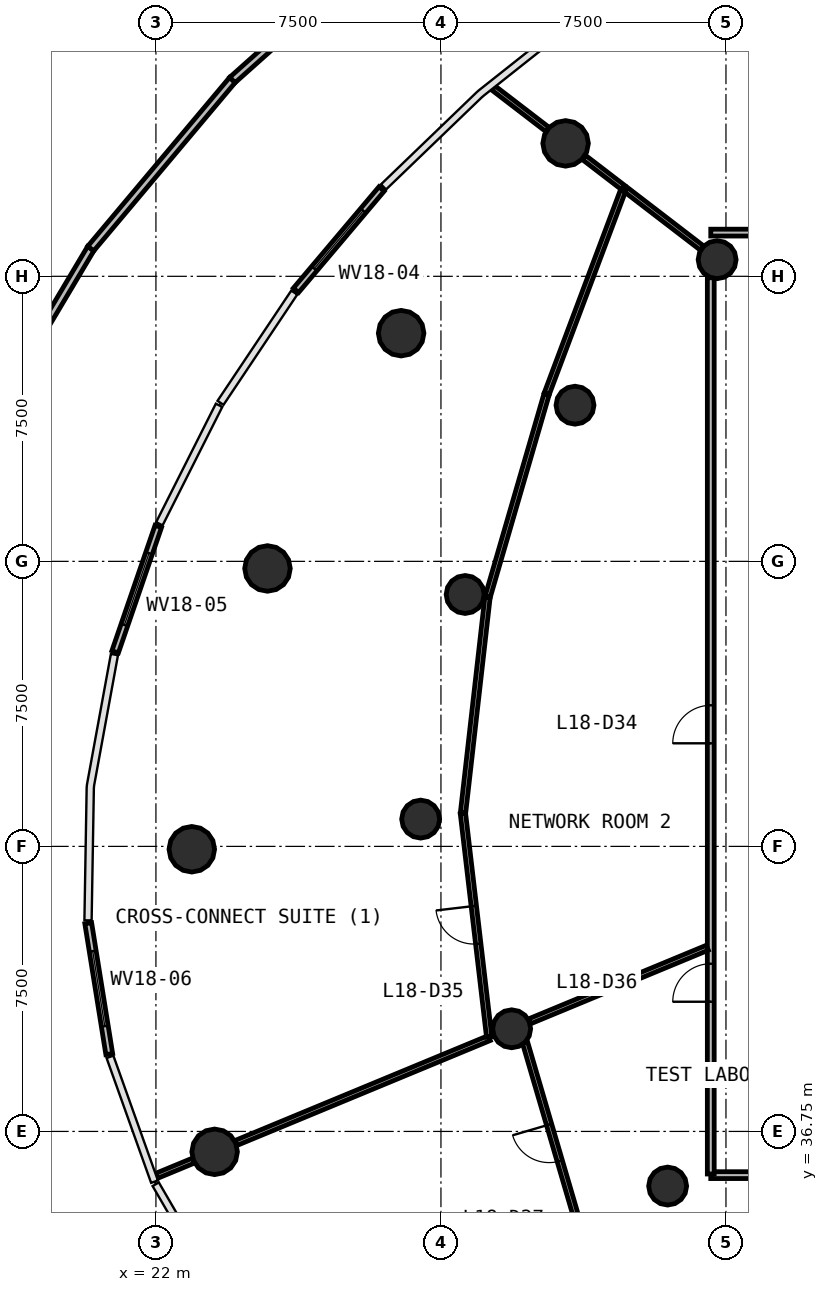
"""IFC4 building model, lengths in metres.
Left out: names, types, materials, properties, quantities, classifications, styles, units other than length and angle.
Written with IfcOpenShell. Run it as: python <this file> out.ifc"""

import sys

from ifc_helpers import new_model, si_unit, direction, frame, frame_2d, origin, origin_2d, place, context, subcontext, project, spatial, rectangle, circle, extrude, source, transform, mapped, element, fill, save


model = new_model("IFC4")
c1 = context("Model", 3, precision=1e-05, world=origin(), true_north=direction((0.0, 1.0)))
c2 = subcontext(c1, "Body", "Model", "MODEL_VIEW")
j1 = project(units=[si_unit("LENGTHUNIT", "METRE"), si_unit("PLANEANGLEUNIT", "RADIAN")], contexts=[c1])
p1 = place(None, origin())
s1 = spatial("IfcSite", under=j1, at=p1, CompositionType="ELEMENT")
p2 = place(p1, origin())
s2 = spatial("IfcBuilding", under=s1, at=p2, CompositionType="ELEMENT")
p3 = place(p2, frame((0.0, 0.0, 79.8)))
s3 = spatial("IfcBuildingStorey", under=s2, at=p3, CompositionType="ELEMENT", Elevation=79.8)
m1 = source(origin(), c2, "Body", "SweptSolid", [
    extrude(circle(Radius=0.6, at=origin_2d()), origin(), (0.0, 0.0, 1.0), 4.5),
])
for number, where, z_axis, x_axis in (
    (1, (32.78, 62.748, -0.4), (0.0, 0.0, 1.0), (1.0, 0.0, 0.0)),
    (2, (28.452, 57.754, -0.4), (0.0, 0.0, 1.0), (1.0, 0.0, 0.0)),
    (3, (24.936, 51.563, -0.4), (0.0, 0.0, 1.0), (1.0, 0.0, 0.0)),
    (4, (22.944, 44.175, -0.4), (0.0, 0.0, 1.0), (1.0, 0.0, 0.0)),
    (5, (23.544, 36.213, -0.4), (0.0, 0.0, 1.0), (1.0, 0.0, 0.0)),
):
    element("IfcColumn", number, at=place(p3, frame(where, z_axis=z_axis, x_axis=x_axis)), inside=s3, PredefinedType="COLUMN", context=c2, shape_type="MappedRepresentation", body=[
        mapped(m1, transform((0.0, 0.0, 0.0), scale=1.0)),
    ])
m2 = source(origin(), c2, "Body", "SweptSolid", [
    extrude(circle(Radius=0.5, at=origin_2d()), origin(), (0.0, 0.0, 1.0), 4.1),
])
for number, where, z_axis, x_axis in (
    (6, (36.768, 59.688, 0.0), (0.0, 0.0, 1.0), (1.0, 0.0, 0.0)),
    (7, (33.028, 55.859, 0.0), (0.0, 0.0, 1.0), (1.0, 0.0, 0.0)),
    (8, (30.137, 50.878, 0.0), (0.0, 0.0, 1.0), (1.0, 0.0, 0.0)),
    (9, (28.966, 44.968, 0.0), (0.0, 0.0, 1.0), (1.0, 0.0, 0.0)),
    (10, (31.361, 39.451, 0.0), (0.0, 0.0, 1.0), (1.0, 0.0, 0.0)),
    (11, (35.465, 35.312, 0.0), (0.0, 0.0, 1.0), (1.0, 0.0, 0.0)),
):
    element("IfcColumn", number, at=place(p3, frame(where, z_axis=z_axis, x_axis=x_axis)), inside=s3, PredefinedType="COLUMN", context=c2, shape_type="MappedRepresentation", body=[
        mapped(m2, transform((0.0, 0.0, 0.0), scale=1.0)),
    ])
p4 = place(p3, frame((27.938, 61.549, 0.0), z_axis=(0.0, 0.0, 1.0), x_axis=(-0.645349538413, -0.763887408765, 0.0)))
e12 = element("IfcWall", 12, at=p4, inside=s3, PredefinedType="STANDARD", context=c2, shape_type="SweptSolid", body=[
    extrude(rectangle(XDim=3.491, YDim=0.18, at=frame_2d((1.746, 0.0))), origin(), (0.0, 0.0, 1.0), 3.7),
])
p5 = place(p4, frame((0.746, 0.0, 0.9)))
e13 = element("IfcOpeningElement", 13, at=p5, cuts=e12, PredefinedType="OPENING", context=c2, shape_type="SweptSolid", body=[
    extrude(rectangle(XDim=2.0, YDim=2.2, at=frame_2d((1.0, 1.1))), frame((0.0, 0.1, 0.0), z_axis=(0.0, -1.0, 0.0), x_axis=(1.0, 0.0, 0.0)), (0.0, 0.0, 1.0), 0.2),
])
p6 = place(p3, frame((22.062, 52.67, 0.0), z_axis=(0.0, 0.0, 1.0), x_axis=(-0.325113007856, -0.945675172627, 0.0)))
e14 = element("IfcWall", 14, at=p6, inside=s3, PredefinedType="STANDARD", context=c2, shape_type="SweptSolid", body=[
    extrude(rectangle(XDim=3.49, YDim=0.18, at=frame_2d((1.745, 0.0))), origin(), (0.0, 0.0, 1.0), 3.7),
])
p7 = place(p6, frame((0.745, 0.0, 0.9)))
e15 = element("IfcOpeningElement", 15, at=p7, cuts=e14, PredefinedType="OPENING", context=c2, shape_type="SweptSolid", body=[
    extrude(rectangle(XDim=2.0, YDim=2.2, at=frame_2d((1.0, 1.1))), frame((0.0, 0.1, 0.0), z_axis=(0.0, -1.0, 0.0), x_axis=(1.0, 0.0, 0.0)), (0.0, 0.0, 1.0), 0.2),
])
p8 = place(p3, frame((20.219, 42.229, 0.0), z_axis=(0.0, 0.0, 1.0), x_axis=(0.15867565855, -0.987330762908, 0.0)))
e16 = element("IfcWall", 16, at=p8, inside=s3, PredefinedType="STANDARD", context=c2, shape_type="SweptSolid", body=[
    extrude(rectangle(XDim=3.488, YDim=0.18, at=frame_2d((1.744, 0.0))), origin(), (0.0, 0.0, 1.0), 3.7),
])
p9 = place(p8, frame((0.744, 0.0, 0.9)))
e17 = element("IfcOpeningElement", 17, at=p9, cuts=e16, PredefinedType="OPENING", context=c2, shape_type="SweptSolid", body=[
    extrude(rectangle(XDim=2.0, YDim=2.2, at=frame_2d((1.0, 1.1))), frame((0.0, 0.1, 0.0), z_axis=(0.0, -1.0, 0.0), x_axis=(1.0, 0.0, 0.0)), (0.0, 0.0, 1.0), 0.2),
])
p10 = place(p3, frame((17.323, 55.003, 0.0), z_axis=(0.0, 0.0, 1.0), x_axis=(0.511331211029, 0.859383728394, 0.0)))
e18 = element("IfcWall", 18, at=p10, inside=s3, PredefinedType="PARAPET", context=c2, shape_type="SweptSolid", body=[
    extrude(rectangle(XDim=5.792, YDim=0.2, at=frame_2d((2.896, 0.0))), origin(), (0.0, 0.0, 1.0), 1.1),
])
p11 = place(p3, frame((20.285, 59.981, 0.0), z_axis=(0.0, 0.0, 1.0), x_axis=(0.643341291458, 0.765579507762, 0.0)))
e19 = element("IfcWall", 19, at=p11, inside=s3, PredefinedType="PARAPET", context=c2, shape_type="SweptSolid", body=[
    extrude(rectangle(XDim=5.794, YDim=0.2, at=frame_2d((2.897, 0.0))), origin(), (0.0, 0.0, 1.0), 1.1),
])
p12 = place(p3, frame((24.013, 64.417, 0.0), z_axis=(0.0, 0.0, 1.0), x_axis=(0.746511452073, 0.665372566255, 0.0)))
e20 = element("IfcWall", 20, at=p12, inside=s3, PredefinedType="PARAPET", context=c2, shape_type="SweptSolid", body=[
    extrude(rectangle(XDim=5.795, YDim=0.2, at=frame_2d((2.897, 0.0))), origin(), (0.0, 0.0, 1.0), 1.1),
])
p13 = place(p3, frame((67.4, 35.6, 0.0), z_axis=(0.0, 0.0, 1.0), x_axis=(-1.0, 0.0, 0.0)))
e21 = element("IfcWall", 21, at=p13, inside=s3, PredefinedType="PARTITIONING", context=c2, shape_type="SweptSolid", body=[
    extrude(rectangle(XDim=30.8, YDim=0.18, at=frame_2d((15.4, 0.0))), origin(), (0.0, 0.0, 1.0), 2.9),
])
p14 = place(p13, frame((17.35, 0.0, 0.0)))
e22 = element("IfcOpeningElement", 22, at=p14, cuts=e21, PredefinedType="OPENING", context=c2, shape_type="SweptSolid", body=[
    extrude(rectangle(XDim=1.0, YDim=2.1, at=frame_2d((0.5, 1.05))), frame((0.0, 0.1, 0.0), z_axis=(0.0, -1.0, 0.0), x_axis=(1.0, 0.0, 0.0)), (0.0, 0.0, 1.0), 0.2),
])
p15 = place(p13, frame((14.95, 0.0, 0.0)))
e23 = element("IfcOpeningElement", 23, at=p15, cuts=e21, PredefinedType="OPENING", context=c2, shape_type="SweptSolid", body=[
    extrude(rectangle(XDim=1.0, YDim=2.1, at=frame_2d((0.5, 1.05))), frame((0.0, 0.1, 0.0), z_axis=(0.0, -1.0, 0.0), x_axis=(1.0, 0.0, 0.0)), (0.0, 0.0, 1.0), 0.2),
])
p16 = place(p3, frame((36.6, 60.4, 0.0), z_axis=(0.0, 0.0, 1.0), x_axis=(1.0, 0.0, 0.0)))
e24 = element("IfcWall", 24, at=p16, inside=s3, PredefinedType="PARTITIONING", context=c2, shape_type="SweptSolid", body=[
    extrude(rectangle(XDim=30.8, YDim=0.18, at=frame_2d((15.4, 0.0))), origin(), (0.0, 0.0, 1.0), 2.9),
])
p17 = place(p16, frame((25.45, 0.0, 0.0)))
e25 = element("IfcOpeningElement", 25, at=p17, cuts=e24, PredefinedType="OPENING", context=c2, shape_type="SweptSolid", body=[
    extrude(rectangle(XDim=0.9, YDim=2.1, at=frame_2d((0.45, 1.05))), frame((0.0, 0.1, 0.0), z_axis=(0.0, -1.0, 0.0), x_axis=(1.0, 0.0, 0.0)), (0.0, 0.0, 1.0), 0.2),
])
p18 = place(p16, frame((17.35, 0.0, 0.0)))
e26 = element("IfcOpeningElement", 26, at=p18, cuts=e24, PredefinedType="OPENING", context=c2, shape_type="SweptSolid", body=[
    extrude(rectangle(XDim=1.0, YDim=2.1, at=frame_2d((0.5, 1.05))), frame((0.0, 0.1, 0.0), z_axis=(0.0, -1.0, 0.0), x_axis=(1.0, 0.0, 0.0)), (0.0, 0.0, 1.0), 0.2),
])
p19 = place(p16, frame((14.95, 0.0, 0.0)))
e27 = element("IfcOpeningElement", 27, at=p19, cuts=e24, PredefinedType="OPENING", context=c2, shape_type="SweptSolid", body=[
    extrude(rectangle(XDim=1.0, YDim=2.1, at=frame_2d((0.5, 1.05))), frame((0.0, 0.1, 0.0), z_axis=(0.0, -1.0, 0.0), x_axis=(1.0, 0.0, 0.0)), (0.0, 0.0, 1.0), 0.2),
])
p20 = place(p16, frame((8.95, 0.0, 0.0)))
e28 = element("IfcOpeningElement", 28, at=p20, cuts=e24, PredefinedType="OPENING", context=c2, shape_type="SweptSolid", body=[
    extrude(rectangle(XDim=1.0, YDim=2.1, at=frame_2d((0.5, 1.05))), frame((0.0, 0.1, 0.0), z_axis=(0.0, -1.0, 0.0), x_axis=(1.0, 0.0, 0.0)), (0.0, 0.0, 1.0), 0.2),
])
p21 = place(p3, frame((36.6, 35.63, 0.0), z_axis=(0.0, 0.0, 1.0), x_axis=(0.0, 1.0, 0.0)))
e29 = element("IfcWall", 29, at=p21, inside=s3, PredefinedType="PARTITIONING", context=c2, shape_type="SweptSolid", body=[
    extrude(rectangle(XDim=23.583, YDim=0.18, at=frame_2d((11.791, 0.0))), origin(), (0.0, 0.0, 1.0), 2.9),
])
p22 = place(p21, frame((11.333, 0.0, 0.0)))
e30 = element("IfcOpeningElement", 30, at=p22, cuts=e29, PredefinedType="OPENING", context=c2, shape_type="SweptSolid", body=[
    extrude(rectangle(XDim=1.0, YDim=2.1, at=frame_2d((0.5, 1.05))), frame((0.0, 0.1, 0.0), z_axis=(0.0, -1.0, 0.0), x_axis=(1.0, 0.0, 0.0)), (0.0, 0.0, 1.0), 0.2),
])
p23 = place(p21, frame((4.532, 0.0, 0.0)))
e31 = element("IfcOpeningElement", 31, at=p23, cuts=e29, PredefinedType="OPENING", context=c2, shape_type="SweptSolid", body=[
    extrude(rectangle(XDim=1.0, YDim=2.1, at=frame_2d((0.5, 1.05))), frame((0.0, 0.1, 0.0), z_axis=(0.0, -1.0, 0.0), x_axis=(1.0, 0.0, 0.0)), (0.0, 0.0, 1.0), 0.2),
])
p24 = place(p3, frame((30.773, 39.208, 0.0), z_axis=(0.0, 0.0, 1.0), x_axis=(-0.923868434379, -0.382710224528, 0.0)))
e32 = element("IfcWall", 32, at=p24, inside=s3, PredefinedType="PARTITIONING", context=c2, shape_type="SweptSolid", body=[
    extrude(rectangle(XDim=7.219, YDim=0.14, at=frame_2d((3.609, 0.0))), origin(), (0.0, 0.0, 1.0), 2.9),
])
p25 = place(p3, frame((30.769, 39.237, 0.0), z_axis=(0.0, 0.0, 1.0), x_axis=(-0.116719162139, 0.993164959707, 0.0)))
e33 = element("IfcWall", 33, at=p25, inside=s3, PredefinedType="PARTITIONING", context=c2, shape_type="SweptSolid", body=[
    extrude(rectangle(XDim=5.917, YDim=0.14, at=frame_2d((2.959, 0.0))), origin(), (0.0, 0.0, 1.0), 2.9),
])
p26 = place(p25, frame((2.467, 0.0, 0.0)))
e34 = element("IfcOpeningElement", 34, at=p26, cuts=e33, PredefinedType="OPENING", context=c2, shape_type="SweptSolid", body=[
    extrude(rectangle(XDim=1.0, YDim=2.1, at=frame_2d((0.5, 1.05))), frame((0.0, 0.08, 0.0), z_axis=(0.0, -1.0, 0.0), x_axis=(1.0, 0.0, 0.0)), (0.0, 0.0, 1.0), 0.16),
])
p27 = place(p3, frame((34.315, 61.57, 0.0), z_axis=(0.0, 0.0, 1.0), x_axis=(-0.351670300138, -0.936123923421, 0.0)))
e35 = element("IfcWall", 35, at=p27, inside=s3, PredefinedType="PARTITIONING", context=c2, shape_type="SweptSolid", body=[
    extrude(rectangle(XDim=5.772, YDim=0.14, at=frame_2d((2.886, 0.0))), origin(), (0.0, 0.0, 1.0), 2.9),
])
p28 = place(p3, frame((30.725, 50.801, 0.0), z_axis=(0.0, 0.0, 1.0), x_axis=(-0.112859657813, -0.993610938767, 0.0)))
e36 = element("IfcWall", 36, at=p28, inside=s3, PredefinedType="PARTITIONING", context=c2, shape_type="SweptSolid", body=[
    extrude(rectangle(XDim=5.694, YDim=0.14, at=frame_2d((2.847, 0.0))), origin(), (0.0, 0.0, 1.0), 2.9),
])
p29 = place(p3, frame((33.297, 33.684, 0.0), z_axis=(0.0, 0.0, 1.0), x_axis=(-0.281401194001, 0.959590208378, 0.0)))
e37 = element("IfcWall", 37, at=p29, inside=s3, PredefinedType="PARTITIONING", context=c2, shape_type="SweptSolid", body=[
    extrude(rectangle(XDim=5.632, YDim=0.14, at=frame_2d((2.816, 0.0))), origin(), (0.0, 0.0, 1.0), 2.9),
])
p30 = place(p29, frame((2.382, 0.0, 0.0)))
e38 = element("IfcOpeningElement", 38, at=p30, cuts=e37, PredefinedType="OPENING", context=c2, shape_type="SweptSolid", body=[
    extrude(rectangle(XDim=1.0, YDim=2.1, at=frame_2d((0.5, 1.05))), frame((0.0, 0.08, 0.0), z_axis=(0.0, -1.0, 0.0), x_axis=(1.0, 0.0, 0.0)), (0.0, 0.0, 1.0), 0.16),
])
p31 = place(p3, frame((32.277, 56.137, 0.0), z_axis=(0.0, 0.0, 1.0), x_axis=(-0.279326579158, -0.960196158176, 0.0)))
e39 = element("IfcWall", 39, at=p31, inside=s3, PredefinedType="PARTITIONING", context=c2, shape_type="SweptSolid", body=[
    extrude(rectangle(XDim=5.527, YDim=0.14, at=frame_2d((2.764, 0.0))), origin(), (0.0, 0.0, 1.0), 2.9),
])
p32 = place(p3, frame((36.51, 41.584, 0.0), z_axis=(0.0, 0.0, 1.0), x_axis=(-0.923890025086, -0.382658100067, 0.0)))
e40 = element("IfcWall", 40, at=p32, inside=s3, PredefinedType="PARTITIONING", context=c2, shape_type="SweptSolid", body=[
    extrude(rectangle(XDim=5.068, YDim=0.14, at=frame_2d((2.534, 0.0))), origin(), (0.0, 0.0, 1.0), 2.9),
])
p33 = place(p3, frame((36.367, 59.995, 0.0), z_axis=(0.0, 0.0, 1.0), x_axis=(-0.793342057606, 0.608776132609, 0.0)))
e41 = element("IfcWall", 41, at=p33, inside=s3, PredefinedType="PARTITIONING", context=c2, shape_type="SweptSolid", body=[
    extrude(rectangle(XDim=2.513, YDim=0.14, at=frame_2d((1.257, 0.0))), origin(), (0.0, 0.0, 1.0), 2.9),
])
p34 = place(p3, frame((32.301, 63.116, 0.0), z_axis=(0.0, 0.0, 1.0), x_axis=(-0.793353764311, 0.608760876415, 0.0)))
e42 = element("IfcWall", 42, at=p34, inside=s3, PredefinedType="PARTITIONING", context=c2, shape_type="SweptSolid", body=[
    extrude(rectangle(XDim=1.79, YDim=0.14, at=frame_2d((0.895, 0.0))), origin(), (0.0, 0.0, 1.0), 2.9),
])
p35 = place(p3, frame((34.292, 61.588, 0.0), z_axis=(0.0, 0.0, 1.0), x_axis=(-0.793397863959, 0.608703400241, 0.0)))
e43 = element("IfcWall", 43, at=p35, inside=s3, PredefinedType="PARTITIONING", context=c2, shape_type="SweptSolid", body=[
    extrude(rectangle(XDim=1.301, YDim=0.14, at=frame_2d((0.65, 0.0))), origin(), (0.0, 0.0, 1.0), 2.9),
])
p36 = place(p3, frame((22.986, 35.982, 0.0), z_axis=(0.0, 0.0, 1.0), x_axis=(-0.923884060829, -0.382672499857, 0.0)))
e44 = element("IfcWall", 44, at=p36, inside=s3, PredefinedType="PARTITIONING", context=c2, shape_type="SweptSolid", body=[
    extrude(rectangle(XDim=1.053, YDim=0.14, at=frame_2d((0.527, 0.0))), origin(), (0.0, 0.0, 1.0), 2.9),
])
m3 = source(origin(), c2, "Body", "SweptSolid", [
    extrude(rectangle(XDim=2.0, YDim=2.2, at=frame_2d((1.0, 1.1))), frame((0.0, 0.03, 0.0), z_axis=(0.0, -1.0, 0.0), x_axis=(1.0, 0.0, 0.0)), (0.0, 0.0, 1.0), 0.06),
])
p37 = place(p5, origin())
e45 = element("IfcWindow", 45, at=p37, inside=s3, PartitioningType="SINGLE_PANEL", PredefinedType="WINDOW", context=c2, shape_type="MappedRepresentation", body=[
    mapped(m3, transform((0.0, 0.0, 0.0), scale=1.0)),
])
fill(e13, e45)
p38 = place(p7, origin())
e46 = element("IfcWindow", 46, at=p38, inside=s3, PartitioningType="SINGLE_PANEL", PredefinedType="WINDOW", context=c2, shape_type="MappedRepresentation", body=[
    mapped(m3, transform((0.0, 0.0, 0.0), scale=1.0)),
])
fill(e15, e46)
p39 = place(p9, origin())
e47 = element("IfcWindow", 47, at=p39, inside=s3, PartitioningType="SINGLE_PANEL", PredefinedType="WINDOW", context=c2, shape_type="MappedRepresentation", body=[
    mapped(m3, transform((0.0, 0.0, 0.0), scale=1.0)),
])
fill(e17, e47)
m4 = source(origin(), c2, "Body", "SweptSolid", [
    extrude(rectangle(XDim=1.0, YDim=2.1, at=frame_2d((0.5, 1.05))), frame((0.0, 0.025, 0.0), z_axis=(0.0, -1.0, 0.0), x_axis=(1.0, 0.0, 0.0)), (0.0, 0.0, 1.0), 0.05),
])
p40 = place(p22, origin())
e48 = element("IfcDoor", 48, at=p40, inside=s3, OperationType="SINGLE_SWING_LEFT", PredefinedType="DOOR", context=c2, shape_type="MappedRepresentation", body=[
    mapped(m4, transform((0.0, 0.0, 0.0), scale=1.0)),
])
fill(e30, e48)
p41 = place(p26, origin())
e49 = element("IfcDoor", 49, at=p41, inside=s3, OperationType="SINGLE_SWING_RIGHT", PredefinedType="DOOR", context=c2, shape_type="MappedRepresentation", body=[
    mapped(m4, transform((0.0, 0.0, 0.0), scale=1.0)),
])
fill(e34, e49)
p42 = place(p23, origin())
e50 = element("IfcDoor", 50, at=p42, inside=s3, OperationType="SINGLE_SWING_LEFT", PredefinedType="DOOR", context=c2, shape_type="MappedRepresentation", body=[
    mapped(m4, transform((0.0, 0.0, 0.0), scale=1.0)),
])
fill(e31, e50)
p43 = place(p30, origin())
e51 = element("IfcDoor", 51, at=p43, inside=s3, OperationType="SINGLE_SWING_RIGHT", PredefinedType="DOOR", context=c2, shape_type="MappedRepresentation", body=[
    mapped(m4, transform((0.0, 0.0, 0.0), scale=1.0)),
])
fill(e38, e51)
save(model, sys.argv[1])
